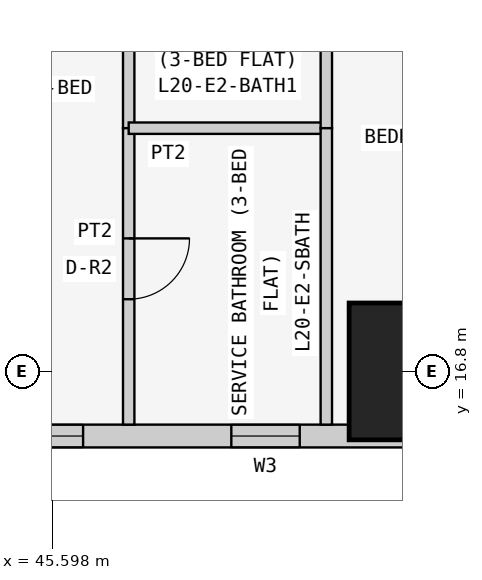
"""IFC4 building model, lengths in metres.
Left out: names, types, materials, properties, quantities, classifications, styles, units other than length and angle.
Written with IfcOpenShell. Run it as: python <this file> out.ifc"""

import sys

from ifc_helpers import new_model, si_unit, direction, frame, frame_2d, origin, origin_2d, place, context, subcontext, project, spatial, rectangle, extrude, element, fill, save


model = new_model("IFC4")
c1 = context("Model", 3, precision=1e-05, world=origin(), true_north=direction((0.0, 1.0)))
c2 = subcontext(c1, "Body", "Model", "MODEL_VIEW")
j1 = project(units=[si_unit("LENGTHUNIT", "METRE"), si_unit("PLANEANGLEUNIT", "RADIAN")], contexts=[c1])
p1 = place(None, origin())
s1 = spatial("IfcSite", under=j1, at=p1, CompositionType="ELEMENT")
p2 = place(p1, origin())
s2 = spatial("IfcBuilding", under=s1, at=p2, CompositionType="ELEMENT")
p3 = place(p2, frame((0.0, 0.0, 81.3)))
s3 = spatial("IfcBuildingStorey", under=s2, at=p3, CompositionType="ELEMENT", Elevation=81.3)
p4 = place(p3, frame((50.4, 16.8, 0.0), z_axis=(0.0, 0.0, 1.0), x_axis=(1.0, 0.0, 0.0)))
e1 = element("IfcColumn", 1, at=p4, inside=s3, PredefinedType="COLUMN", context=c2, shape_type="SweptSolid", body=[
    extrude(rectangle(XDim=1.8, YDim=1.8, at=origin_2d()), origin(), (0.0, 0.0, 1.0), 3.6),
])
p5 = place(p3, frame((43.0, 15.95, 0.0), z_axis=(0.0, 0.0, 1.0), x_axis=(1.0, 0.0, 0.0)))
e2 = element("IfcWall", 2, at=p5, inside=s3, PredefinedType="SOLIDWALL", context=c2, shape_type="SweptSolid", body=[
    extrude(rectangle(XDim=15.4, YDim=0.3, at=frame_2d((7.7, 0.0))), origin(), (0.0, 0.0, 1.0), 3.45),
])
p6 = place(p5, frame((1.2, 0.0, 0.9)))
e3 = element("IfcOpeningElement", 3, at=p6, cuts=e2, PredefinedType="OPENING", context=c2, shape_type="SweptSolid", body=[
    extrude(rectangle(XDim=1.8, YDim=1.5, at=frame_2d((0.9, 0.75))), frame((0.0, 0.16, 0.0), z_axis=(0.0, -1.0, 0.0), x_axis=(1.0, 0.0, 0.0)), (0.0, 0.0, 1.0), 0.32),
])
p7 = place(p5, frame((4.95, 0.0, 1.5)))
e4 = element("IfcOpeningElement", 4, at=p7, cuts=e2, PredefinedType="OPENING", context=c2, shape_type="SweptSolid", body=[
    extrude(rectangle(XDim=0.9, YDim=0.7, at=frame_2d((0.45, 0.35))), frame((0.0, 0.16, 0.0), z_axis=(0.0, -1.0, 0.0), x_axis=(1.0, 0.0, 0.0)), (0.0, 0.0, 1.0), 0.32),
])
p8 = place(p5, frame((8.5, 0.0, 0.9)))
e5 = element("IfcOpeningElement", 5, at=p8, cuts=e2, PredefinedType="OPENING", context=c2, shape_type="SweptSolid", body=[
    extrude(rectangle(XDim=1.8, YDim=1.5, at=frame_2d((0.9, 0.75))), frame((0.0, 0.16, 0.0), z_axis=(0.0, -1.0, 0.0), x_axis=(1.0, 0.0, 0.0)), (0.0, 0.0, 1.0), 0.32),
])
p9 = place(p5, frame((12.5, 0.0, 0.0)))
e6 = element("IfcOpeningElement", 6, at=p9, cuts=e2, PredefinedType="OPENING", context=c2, shape_type="SweptSolid", body=[
    extrude(rectangle(XDim=0.9, YDim=2.4, at=frame_2d((0.45, 1.2))), frame((0.0, 0.16, 0.0), z_axis=(0.0, -1.0, 0.0), x_axis=(1.0, 0.0, 0.0)), (0.0, 0.0, 1.0), 0.32),
])
p10 = place(p5, frame((13.5, 0.0, 0.9)))
e7 = element("IfcOpeningElement", 7, at=p10, cuts=e2, PredefinedType="OPENING", context=c2, shape_type="SweptSolid", body=[
    extrude(rectangle(XDim=1.2, YDim=1.5, at=frame_2d((0.6, 0.75))), frame((0.0, 0.16, 0.0), z_axis=(0.0, -1.0, 0.0), x_axis=(1.0, 0.0, 0.0)), (0.0, 0.0, 1.0), 0.32),
])
p11 = place(p3, frame((46.6, 22.971, 0.0), z_axis=(0.0, 0.0, 1.0), x_axis=(0.0, -1.0, 0.0)))
e8 = element("IfcWall", 8, at=p11, inside=s3, PredefinedType="PARTITIONING", context=c2, shape_type="SweptSolid", body=[
    extrude(rectangle(XDim=2.971, YDim=0.15, at=frame_2d((1.485, 0.0))), origin(), (0.0, 0.0, 1.0), 3.45),
])
p12 = place(p3, frame((46.6, 20.0, 0.0), z_axis=(0.0, 0.0, 1.0), x_axis=(0.0, -1.0, 0.0)))
e9 = element("IfcWall", 9, at=p12, inside=s3, PredefinedType="PARTITIONING", context=c2, shape_type="SweptSolid", body=[
    extrude(rectangle(XDim=3.9, YDim=0.15, at=frame_2d((1.95, 0.0))), origin(), (0.0, 0.0, 1.0), 3.45),
])
p13 = place(p12, frame((1.45, 0.0, 0.0)))
e10 = element("IfcOpeningElement", 10, at=p13, cuts=e9, PredefinedType="OPENING", context=c2, shape_type="SweptSolid", body=[
    extrude(rectangle(XDim=0.8, YDim=2.1, at=frame_2d((0.4, 1.05))), frame((0.0, 0.085, 0.0), z_axis=(0.0, -1.0, 0.0), x_axis=(1.0, 0.0, 0.0)), (0.0, 0.0, 1.0), 0.17),
])
p14 = place(p3, frame((49.2, 20.0, 0.0), z_axis=(0.0, 0.0, 1.0), x_axis=(-1.0, 0.0, 0.0)))
e11 = element("IfcWall", 11, at=p14, inside=s3, PredefinedType="PARTITIONING", context=c2, shape_type="SweptSolid", body=[
    extrude(rectangle(XDim=2.6, YDim=0.15, at=frame_2d((1.3, 0.0))), origin(), (0.0, 0.0, 1.0), 3.45),
])
p15 = place(p3, frame((49.2, 22.971, 0.0), z_axis=(0.0, 0.0, 1.0), x_axis=(0.0, -1.0, 0.0)))
e12 = element("IfcWall", 12, at=p15, inside=s3, PredefinedType="PARTITIONING", context=c2, shape_type="SweptSolid", body=[
    extrude(rectangle(XDim=2.971, YDim=0.15, at=frame_2d((1.485, 0.0))), origin(), (0.0, 0.0, 1.0), 3.45),
])
p16 = place(p3, frame((49.2, 20.0, 0.0), z_axis=(0.0, 0.0, 1.0), x_axis=(0.0, -1.0, 0.0)))
e13 = element("IfcWall", 13, at=p16, inside=s3, PredefinedType="PARTITIONING", context=c2, shape_type="SweptSolid", body=[
    extrude(rectangle(XDim=3.9, YDim=0.15, at=frame_2d((1.95, 0.0))), origin(), (0.0, 0.0, 1.0), 3.45),
])
p17 = place(p6, origin())
e14 = element("IfcWindow", 14, at=p17, inside=s3, PartitioningType="SINGLE_PANEL", PredefinedType="WINDOW", context=c2, shape_type="SweptSolid", body=[
    extrude(rectangle(XDim=1.8, YDim=1.5, at=frame_2d((0.9, 0.75))), frame((0.0, 0.03, 0.0), z_axis=(0.0, -1.0, 0.0), x_axis=(1.0, 0.0, 0.0)), (0.0, 0.0, 1.0), 0.06),
])
fill(e3, e14)
p18 = place(p7, origin())
e15 = element("IfcWindow", 15, at=p18, inside=s3, PartitioningType="SINGLE_PANEL", PredefinedType="WINDOW", context=c2, shape_type="SweptSolid", body=[
    extrude(rectangle(XDim=0.9, YDim=0.7, at=frame_2d((0.45, 0.35))), frame((0.0, 0.03, 0.0), z_axis=(0.0, -1.0, 0.0), x_axis=(1.0, 0.0, 0.0)), (0.0, 0.0, 1.0), 0.06),
])
fill(e4, e15)
p19 = place(p13, origin())
e16 = element("IfcDoor", 16, at=p19, inside=s3, OperationType="SINGLE_SWING_LEFT", PredefinedType="DOOR", context=c2, shape_type="SweptSolid", body=[
    extrude(rectangle(XDim=0.8, YDim=2.1, at=frame_2d((0.4, 1.05))), frame((0.0, 0.025, 0.0), z_axis=(0.0, -1.0, 0.0), x_axis=(1.0, 0.0, 0.0)), (0.0, 0.0, 1.0), 0.05),
])
fill(e10, e16)
save(model, sys.argv[1])
